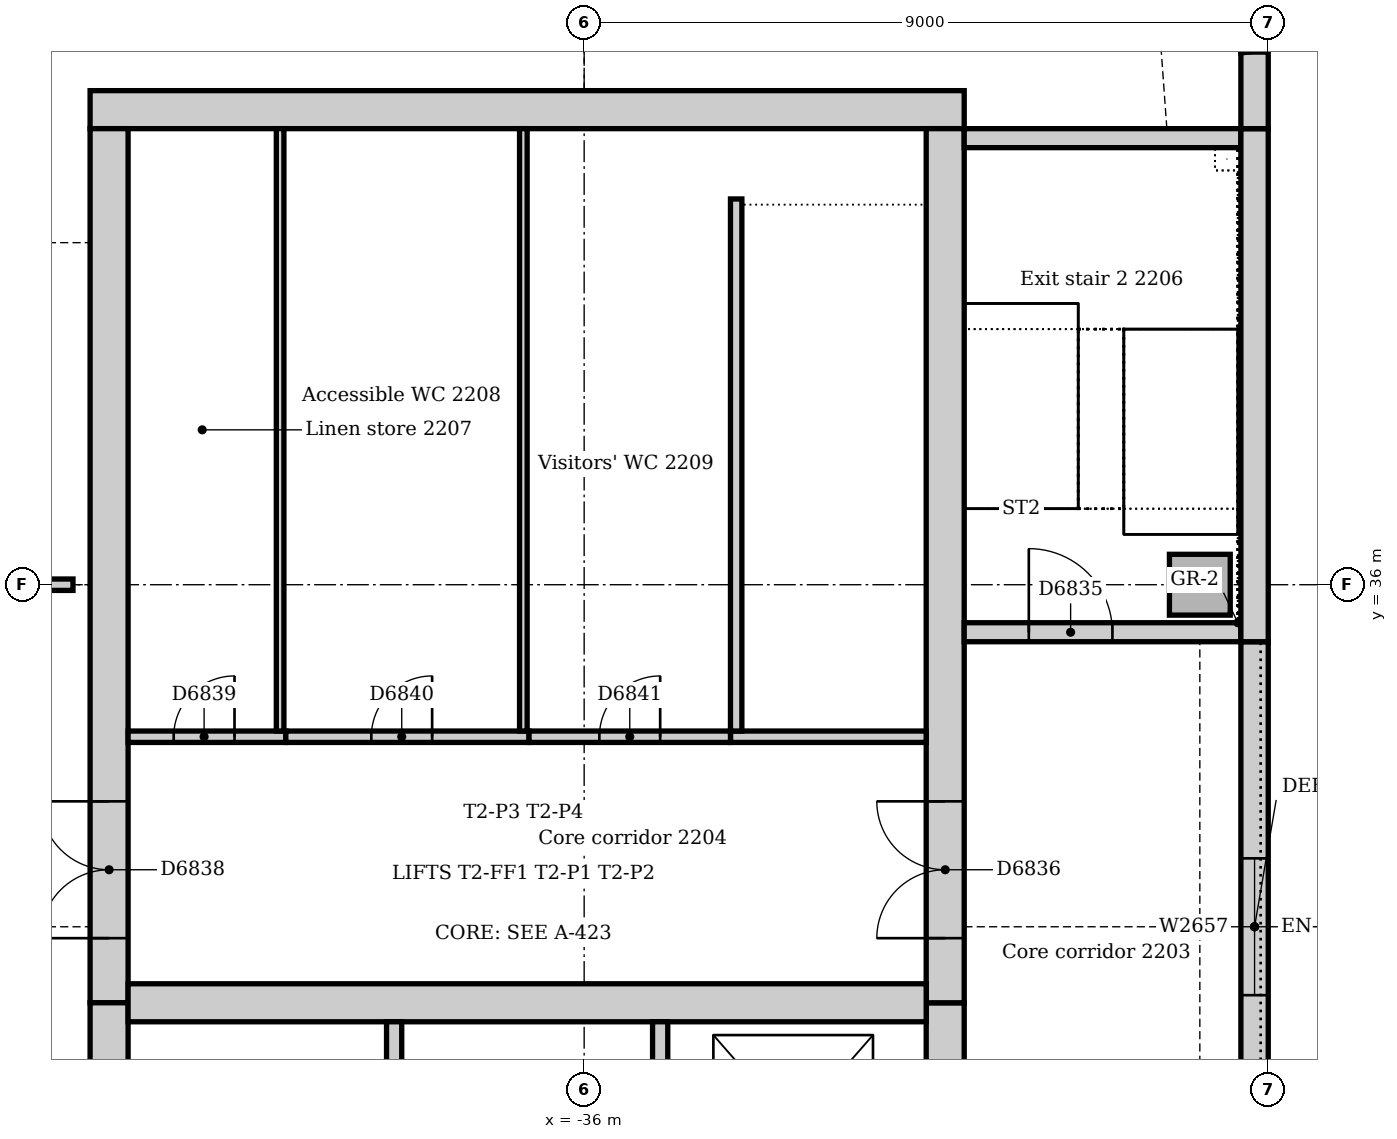
"""IFC4 building model, lengths in metres.
Left out: names, types, materials, properties, quantities, classifications, styles, units other than length and angle.
Written with IfcOpenShell. Run it as: python <this file> out.ifc"""

import sys

from ifc_helpers import new_model, si_unit, direction, frame, frame_2d, origin, origin_2d, place, context, subcontext, project, spatial, rectangle, extrude, element, fill, save


model = new_model("IFC4")
c1 = context("Model", 3, precision=1e-05, world=origin(), true_north=direction((0.0, 1.0)))
c2 = subcontext(c1, "Body", "Model", "MODEL_VIEW")
j1 = project(units=[si_unit("LENGTHUNIT", "METRE"), si_unit("PLANEANGLEUNIT", "RADIAN")], contexts=[c1])
p1 = place(None, origin())
s1 = spatial("IfcSite", under=j1, at=p1, CompositionType="ELEMENT")
p2 = place(p1, origin())
s2 = spatial("IfcBuilding", under=s1, at=p2, CompositionType="ELEMENT")
p3 = place(p2, frame((0.0, 0.0, 95.0)))
s3 = spatial("IfcBuildingStorey", under=s2, at=p3, CompositionType="ELEMENT", Elevation=95.0)
p4 = place(p3, frame((-31.0, 42.25, 0.0), z_axis=(0.0, 0.0, 1.0), x_axis=(-1.0, 0.0, 0.0)))
e1 = element("IfcWall", 1, at=p4, inside=s3, PredefinedType="SOLIDWALL", context=c2, shape_type="SweptSolid", body=[
    extrude(rectangle(XDim=11.5, YDim=0.5, at=frame_2d((5.75, 0.0))), origin(), (0.0, 0.0, 1.0), 5.0),
])
p5 = place(p3, frame((-31.25, 21.0, 0.0), z_axis=(0.0, 0.0, 1.0), x_axis=(0.0, 1.0, 0.0)))
e2 = element("IfcWall", 2, at=p5, inside=s3, PredefinedType="SOLIDWALL", context=c2, shape_type="SweptSolid", body=[
    extrude(rectangle(XDim=9.5, YDim=0.5, at=frame_2d((4.75, 0.0))), origin(), (0.0, 0.0, 1.0), 5.0),
])
p6 = place(p5, frame((5.25, 0.0, 0.0)))
e3 = element("IfcOpeningElement", 3, at=p6, cuts=e2, PredefinedType="OPENING", context=c2, shape_type="SweptSolid", body=[
    extrude(rectangle(XDim=1.0, YDim=2.1, at=frame_2d((0.5, 1.05))), frame((0.0, 0.26, 0.0), z_axis=(0.0, -1.0, 0.0), x_axis=(1.0, 0.0, 0.0)), (0.0, 0.0, 1.0), 0.52),
])
p7 = place(p3, frame((-31.25, 30.5, 0.0), z_axis=(0.0, 0.0, 1.0), x_axis=(0.0, 1.0, 0.0)))
e4 = element("IfcWall", 4, at=p7, inside=s3, PredefinedType="SOLIDWALL", context=c2, shape_type="SweptSolid", body=[
    extrude(rectangle(XDim=11.5, YDim=0.5, at=frame_2d((5.75, 0.0))), origin(), (0.0, 0.0, 1.0), 5.0),
])
p8 = place(p7, frame((0.85, 0.0, 0.0)))
e5 = element("IfcOpeningElement", 5, at=p8, cuts=e4, PredefinedType="OPENING", context=c2, shape_type="SweptSolid", body=[
    extrude(rectangle(XDim=1.8, YDim=2.1, at=frame_2d((0.9, 1.05))), frame((0.0, 0.26, 0.0), z_axis=(0.0, -1.0, 0.0), x_axis=(1.0, 0.0, 0.0)), (0.0, 0.0, 1.0), 0.52),
])
p9 = place(p3, frame((-42.25, 42.0, 0.0), z_axis=(0.0, 0.0, 1.0), x_axis=(0.0, -1.0, 0.0)))
e6 = element("IfcWall", 6, at=p9, inside=s3, PredefinedType="SOLIDWALL", context=c2, shape_type="SweptSolid", body=[
    extrude(rectangle(XDim=11.5, YDim=0.5, at=frame_2d((5.75, 0.0))), origin(), (0.0, 0.0, 1.0), 5.0),
])
p10 = place(p9, frame((8.85, 0.0, 0.0)))
e7 = element("IfcOpeningElement", 7, at=p10, cuts=e6, PredefinedType="OPENING", context=c2, shape_type="SweptSolid", body=[
    extrude(rectangle(XDim=1.8, YDim=2.1, at=frame_2d((0.9, 1.05))), frame((0.0, 0.26, 0.0), z_axis=(0.0, -1.0, 0.0), x_axis=(1.0, 0.0, 0.0)), (0.0, 0.0, 1.0), 0.52),
])
p11 = place(p3, frame((-42.25, 30.5, 0.0), z_axis=(0.0, 0.0, 1.0), x_axis=(0.0, -1.0, 0.0)))
e8 = element("IfcWall", 8, at=p11, inside=s3, PredefinedType="SOLIDWALL", context=c2, shape_type="SweptSolid", body=[
    extrude(rectangle(XDim=9.5, YDim=0.5, at=frame_2d((4.75, 0.0))), origin(), (0.0, 0.0, 1.0), 5.0),
])
p12 = place(p11, frame((3.85, 0.0, 0.0)))
e9 = element("IfcOpeningElement", 9, at=p12, cuts=e8, PredefinedType="OPENING", context=c2, shape_type="SweptSolid", body=[
    extrude(rectangle(XDim=1.8, YDim=2.1, at=frame_2d((0.9, 1.05))), frame((0.0, 0.26, 0.0), z_axis=(0.0, -1.0, 0.0), x_axis=(1.0, 0.0, 0.0)), (0.0, 0.0, 1.0), 0.52),
])
p13 = place(p3, frame((-42.0, 30.5, 0.0), z_axis=(0.0, 0.0, 1.0), x_axis=(1.0, 0.0, 0.0)))
e10 = element("IfcWall", 10, at=p13, inside=s3, PredefinedType="SOLIDWALL", context=c2, shape_type="SweptSolid", body=[
    extrude(rectangle(XDim=10.5, YDim=0.5, at=frame_2d((5.25, 0.0))), origin(), (0.0, 0.0, 1.0), 5.0),
])
p14 = place(p3, frame((-31.0, 35.375, 0.0), z_axis=(0.0, 0.0, 1.0), x_axis=(1.0, 0.0, 0.0)))
e11 = element("IfcWall", 11, at=p14, inside=s3, PredefinedType="SOLIDWALL", context=c2, shape_type="SweptSolid", body=[
    extrude(rectangle(XDim=3.64, YDim=0.25, at=frame_2d((1.82, 0.0))), origin(), (0.0, 0.0, 1.0), 5.0),
])
p15 = place(p14, frame((0.85, 0.0, 0.0)))
e12 = element("IfcOpeningElement", 12, at=p15, cuts=e11, PredefinedType="OPENING", context=c2, shape_type="SweptSolid", body=[
    extrude(rectangle(XDim=1.1, YDim=2.1, at=frame_2d((0.55, 1.05))), frame((0.0, 0.135, 0.0), z_axis=(0.0, -1.0, 0.0), x_axis=(1.0, 0.0, 0.0)), (0.0, 0.0, 1.0), 0.27),
])
p16 = place(p3, frame((-27.36, 41.875, 0.0), z_axis=(0.0, 0.0, 1.0), x_axis=(-1.0, 0.0, 0.0)))
e13 = element("IfcWall", 13, at=p16, inside=s3, PredefinedType="SOLIDWALL", context=c2, shape_type="SweptSolid", body=[
    extrude(rectangle(XDim=3.64, YDim=0.25, at=frame_2d((1.82, 0.0))), origin(), (0.0, 0.0, 1.0), 5.0),
])
p17 = place(p3, frame((-27.9, 36.0, 0.0), z_axis=(0.0, 0.0, 1.0), x_axis=(1.0, 0.0, 0.0)))
e14 = element("IfcColumn", 14, at=p17, inside=s3, PredefinedType="COLUMN", context=c2, shape_type="SweptSolid", body=[
    extrude(rectangle(XDim=0.8, YDim=0.8, at=origin_2d()), origin(), (0.0, 0.0, 1.0), 5.0),
])
p18 = place(p3, frame((-27.18, 27.75, 0.0), z_axis=(0.0, 0.0, 1.0), x_axis=(0.0, 1.0, 0.0)))
e15 = element("IfcWall", 15, at=p18, inside=s3, PredefinedType="STANDARD", context=c2, shape_type="SweptSolid", body=[
    extrude(rectangle(XDim=7.5, YDim=0.36, at=frame_2d((3.75, 0.0))), origin(), (0.0, 0.0, 1.0), 4.85),
])
p19 = place(p18, frame((2.85, 0.0, 1.2)))
e16 = element("IfcOpeningElement", 16, at=p19, cuts=e15, PredefinedType="OPENING", context=c2, shape_type="SweptSolid", body=[
    extrude(rectangle(XDim=1.8, YDim=1.2, at=frame_2d((0.9, 0.6))), frame((0.0, 0.19, 0.0), z_axis=(0.0, -1.0, 0.0), x_axis=(1.0, 0.0, 0.0)), (0.0, 0.0, 1.0), 0.38),
])
p20 = place(p3, frame((-27.18, 35.25, 0.0), z_axis=(0.0, 0.0, 1.0), x_axis=(0.0, 1.0, 0.0)))
e17 = element("IfcWall", 17, at=p20, inside=s3, PredefinedType="STANDARD", context=c2, shape_type="SweptSolid", body=[
    extrude(rectangle(XDim=6.75, YDim=0.36, at=frame_2d((3.375, 0.0))), origin(), (0.0, 0.0, 1.0), 4.85),
])
p21 = place(p3, frame((-27.18, 42.0, 0.0), z_axis=(0.0, 0.0, 1.0), x_axis=(0.0, 1.0, 0.0)))
e18 = element("IfcWall", 18, at=p21, inside=s3, PredefinedType="STANDARD", context=c2, shape_type="SweptSolid", body=[
    extrude(rectangle(XDim=1.007, YDim=0.36, at=frame_2d((0.504, 0.0))), origin(), (0.0, 0.0, 1.0), 4.85),
])
p22 = place(p3, frame((-27.183, 43.019, 0.0), z_axis=(0.0, 0.0, 1.0), x_axis=(-0.13055608231, 0.99144092581, 0.0)))
e19 = element("IfcWall", 19, at=p22, inside=s3, PredefinedType="STANDARD", context=c2, shape_type="SweptSolid", body=[
    extrude(rectangle(XDim=0.713, YDim=0.36, at=frame_2d((0.356, 0.0))), origin(), (0.0, 0.0, 1.0), 3.25),
])
for number, where, z_axis, x_axis in (
    (20, (-38.5, 27.4, 0.0), (0.0, 0.0, 1.0), (0.0, 1.0, 0.0)),
    (21, (-35.0, 27.4, 0.0), (0.0, 0.0, 1.0), (0.0, 1.0, 0.0)),
):
    element("IfcWall", number, at=place(p3, frame(where, z_axis=z_axis, x_axis=x_axis)), inside=s3, PredefinedType="SOLIDWALL", context=c2, shape_type="SweptSolid", body=[
        extrude(rectangle(XDim=2.85, YDim=0.2, at=frame_2d((1.425, 0.0))), origin(), (0.0, 0.0, 1.0), 5.0),
    ])
p23 = place(p3, frame((-34.075, 34.0, 0.0), z_axis=(0.0, 0.0, 1.0), x_axis=(1.0, 0.0, 0.0)))
e22 = element("IfcWall", 22, at=p23, inside=s3, PredefinedType="SOLIDWALL", context=c2, shape_type="SweptSolid", body=[
    extrude(rectangle(XDim=2.575, YDim=0.15, at=frame_2d((1.288, 0.0))), origin(), (0.0, 0.0, 1.0), 5.0),
])
p24 = place(p3, frame((-34.0, 41.075, 0.0), z_axis=(0.0, 0.0, 1.0), x_axis=(0.0, -1.0, 0.0)))
e23 = element("IfcWall", 23, at=p24, inside=s3, PredefinedType="SOLIDWALL", context=c2, shape_type="SweptSolid", body=[
    extrude(rectangle(XDim=7.0, YDim=0.15, at=frame_2d((3.5, 0.0))), origin(), (0.0, 0.0, 1.0), 5.0),
])
p25 = place(p3, frame((-39.925, 34.0, 0.0), z_axis=(0.0, 0.0, 1.0), x_axis=(-1.0, 0.0, 0.0)))
e24 = element("IfcWall", 24, at=p25, inside=s3, PredefinedType="PARTITIONING", context=c2, shape_type="SweptSolid", body=[
    extrude(rectangle(XDim=2.075, YDim=0.15, at=frame_2d((1.038, 0.0))), origin(), (0.0, 0.0, 1.0), 4.85),
])
p26 = place(p25, frame((0.675, 0.0, 0.0)))
e25 = element("IfcOpeningElement", 25, at=p26, cuts=e24, PredefinedType="OPENING", context=c2, shape_type="SweptSolid", body=[
    extrude(rectangle(XDim=0.8, YDim=2.1, at=frame_2d((0.4, 1.05))), frame((0.0, 0.085, 0.0), z_axis=(0.0, -1.0, 0.0), x_axis=(1.0, 0.0, 0.0)), (0.0, 0.0, 1.0), 0.17),
])
p27 = place(p3, frame((-36.725, 34.0, 0.0), z_axis=(0.0, 0.0, 1.0), x_axis=(-1.0, 0.0, 0.0)))
e26 = element("IfcWall", 26, at=p27, inside=s3, PredefinedType="PARTITIONING", context=c2, shape_type="SweptSolid", body=[
    extrude(rectangle(XDim=3.2, YDim=0.15, at=frame_2d((1.6, 0.0))), origin(), (0.0, 0.0, 1.0), 4.85),
])
p28 = place(p27, frame((1.275, 0.0, 0.0)))
e27 = element("IfcOpeningElement", 27, at=p28, cuts=e26, PredefinedType="OPENING", context=c2, shape_type="SweptSolid", body=[
    extrude(rectangle(XDim=0.8, YDim=2.1, at=frame_2d((0.4, 1.05))), frame((0.0, 0.085, 0.0), z_axis=(0.0, -1.0, 0.0), x_axis=(1.0, 0.0, 0.0)), (0.0, 0.0, 1.0), 0.17),
])
p29 = place(p3, frame((-34.075, 34.0, 0.0), z_axis=(0.0, 0.0, 1.0), x_axis=(-1.0, 0.0, 0.0)))
e28 = element("IfcWall", 28, at=p29, inside=s3, PredefinedType="PARTITIONING", context=c2, shape_type="SweptSolid", body=[
    extrude(rectangle(XDim=2.65, YDim=0.15, at=frame_2d((1.325, 0.0))), origin(), (0.0, 0.0, 1.0), 4.85),
])
p30 = place(p29, frame((0.925, 0.0, 0.0)))
e29 = element("IfcOpeningElement", 29, at=p30, cuts=e28, PredefinedType="OPENING", context=c2, shape_type="SweptSolid", body=[
    extrude(rectangle(XDim=0.8, YDim=2.1, at=frame_2d((0.4, 1.05))), frame((0.0, 0.085, 0.0), z_axis=(0.0, -1.0, 0.0), x_axis=(1.0, 0.0, 0.0)), (0.0, 0.0, 1.0), 0.17),
])
for number, where, z_axis, x_axis in (
    (30, (-40.0, 34.075, 0.0), (0.0, 0.0, 1.0), (0.0, 1.0, 0.0)),
    (31, (-36.8, 34.075, 0.0), (0.0, 0.0, 1.0), (0.0, 1.0, 0.0)),
):
    element("IfcWall", number, at=place(p3, frame(where, z_axis=z_axis, x_axis=x_axis)), inside=s3, PredefinedType="PARTITIONING", context=c2, shape_type="SweptSolid", body=[
        extrude(rectangle(XDim=7.925, YDim=0.1, at=frame_2d((3.962, 0.0))), origin(), (0.0, 0.0, 1.0), 4.85),
    ])
p31 = place(p3, frame((-44.65, 36.0, 0.0), z_axis=(0.0, 0.0, 1.0), x_axis=(1.0, 0.0, 0.0)))
e32 = element("IfcWall", 32, at=p31, inside=s3, PredefinedType="PARTITIONING", context=c2, shape_type="SweptSolid", body=[
    extrude(rectangle(XDim=1.925, YDim=0.15, at=frame_2d((0.963, 0.0))), origin(), (0.0, 0.0, 1.0), 4.602),
])
p32 = place(p31, frame((0.45, 0.0, 0.0)))
e33 = element("IfcOpeningElement", 33, at=p32, cuts=e32, PredefinedType="OPENING", context=c2, shape_type="SweptSolid", body=[
    extrude(rectangle(XDim=1.0, YDim=2.1, at=frame_2d((0.5, 1.05))), frame((0.0, 0.085, 0.0), z_axis=(0.0, -1.0, 0.0), x_axis=(1.0, 0.0, 0.0)), (0.0, 0.0, 1.0), 0.17),
])
p33 = place(p19, origin())
e34 = element("IfcWindow", 34, at=p33, inside=s3, PartitioningType="SINGLE_PANEL", PredefinedType="WINDOW", context=c2, shape_type="SweptSolid", body=[
    extrude(rectangle(XDim=1.8, YDim=1.2, at=frame_2d((0.9, 0.6))), frame((0.0, 0.13, 0.0), z_axis=(0.0, -1.0, 0.0), x_axis=(1.0, 0.0, 0.0)), (0.0, 0.0, 1.0), 0.06),
])
fill(e16, e34)
p34 = place(p15, origin())
e35 = element("IfcDoor", 35, at=p34, inside=s3, OperationType="SINGLE_SWING_LEFT", PredefinedType="DOOR", context=c2, shape_type="SweptSolid", body=[
    extrude(rectangle(XDim=1.1, YDim=2.1, at=frame_2d((0.55, 1.05))), frame((0.0, 0.025, 0.0), z_axis=(0.0, -1.0, 0.0), x_axis=(1.0, 0.0, 0.0)), (0.0, 0.0, 1.0), 0.05),
])
fill(e12, e35)
p35 = place(p8, origin())
e36 = element("IfcDoor", 36, at=p35, inside=s3, OperationType="DOUBLE_DOOR_SINGLE_SWING", PredefinedType="DOOR", context=c2, shape_type="SweptSolid", body=[
    extrude(rectangle(XDim=1.8, YDim=2.1, at=frame_2d((0.9, 1.05))), frame((0.0, 0.025, 0.0), z_axis=(0.0, -1.0, 0.0), x_axis=(1.0, 0.0, 0.0)), (0.0, 0.0, 1.0), 0.05),
])
fill(e5, e36)
p36 = place(p10, frame((1.8, 0.0, 0.0), z_axis=(0.0, 0.0, 1.0), x_axis=(-1.0, 0.0, 0.0)))
e37 = element("IfcDoor", 37, at=p36, inside=s3, OperationType="DOUBLE_DOOR_SINGLE_SWING", PredefinedType="DOOR", context=c2, shape_type="SweptSolid", body=[
    extrude(rectangle(XDim=1.8, YDim=2.1, at=frame_2d((0.9, 1.05))), frame((0.0, 0.025, 0.0), z_axis=(0.0, -1.0, 0.0), x_axis=(1.0, 0.0, 0.0)), (0.0, 0.0, 1.0), 0.05),
])
fill(e7, e37)
p37 = place(p26, frame((0.8, 0.0, 0.0), z_axis=(0.0, 0.0, 1.0), x_axis=(-1.0, 0.0, 0.0)))
e38 = element("IfcDoor", 38, at=p37, inside=s3, OperationType="SINGLE_SWING_RIGHT", PredefinedType="DOOR", context=c2, shape_type="SweptSolid", body=[
    extrude(rectangle(XDim=0.8, YDim=2.1, at=frame_2d((0.4, 1.05))), frame((0.0, 0.025, 0.0), z_axis=(0.0, -1.0, 0.0), x_axis=(1.0, 0.0, 0.0)), (0.0, 0.0, 1.0), 0.05),
])
fill(e25, e38)
p38 = place(p28, frame((0.8, 0.0, 0.0), z_axis=(0.0, 0.0, 1.0), x_axis=(-1.0, 0.0, 0.0)))
e39 = element("IfcDoor", 39, at=p38, inside=s3, OperationType="SINGLE_SWING_RIGHT", PredefinedType="DOOR", context=c2, shape_type="SweptSolid", body=[
    extrude(rectangle(XDim=0.8, YDim=2.1, at=frame_2d((0.4, 1.05))), frame((0.0, 0.025, 0.0), z_axis=(0.0, -1.0, 0.0), x_axis=(1.0, 0.0, 0.0)), (0.0, 0.0, 1.0), 0.05),
])
fill(e27, e39)
p39 = place(p30, frame((0.8, 0.0, 0.0), z_axis=(0.0, 0.0, 1.0), x_axis=(-1.0, 0.0, 0.0)))
e40 = element("IfcDoor", 40, at=p39, inside=s3, OperationType="SINGLE_SWING_RIGHT", PredefinedType="DOOR", context=c2, shape_type="SweptSolid", body=[
    extrude(rectangle(XDim=0.8, YDim=2.1, at=frame_2d((0.4, 1.05))), frame((0.0, 0.025, 0.0), z_axis=(0.0, -1.0, 0.0), x_axis=(1.0, 0.0, 0.0)), (0.0, 0.0, 1.0), 0.05),
])
fill(e29, e40)
save(model, sys.argv[1])
